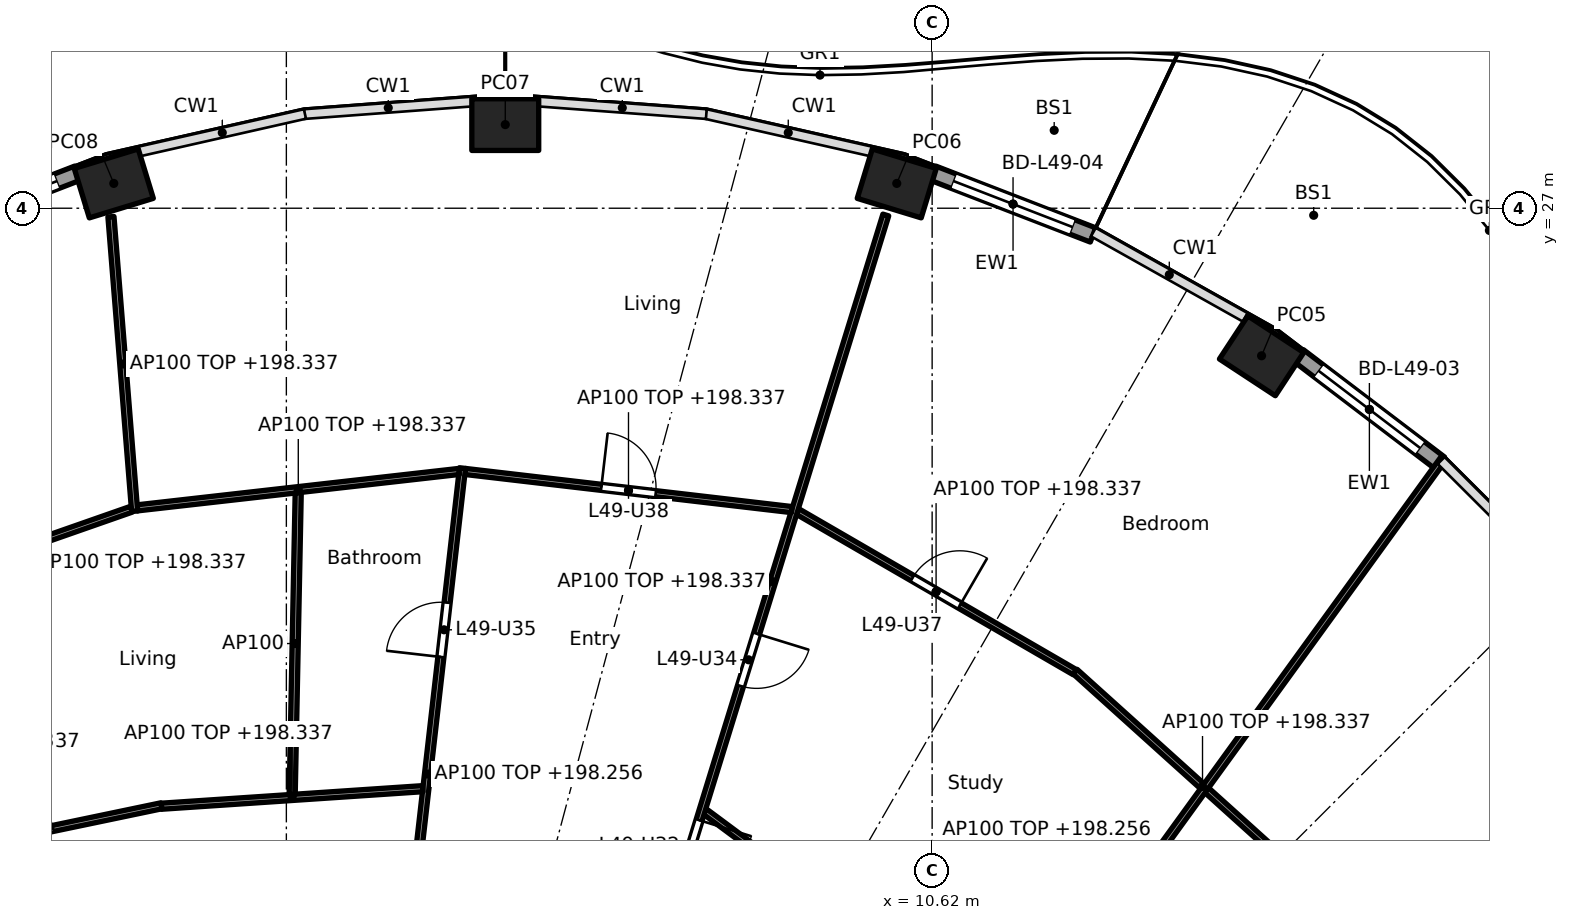
"""IFC4 building model, lengths in metres.
Left out: names, types, materials, properties, quantities, classifications, styles, units other than length and angle.
Written with IfcOpenShell. Run it as: python <this file> out.ifc"""

import sys

from ifc_helpers import new_model, si_unit, direction, frame, frame_2d, origin, origin_2d, place, context, subcontext, project, spatial, rectangle, hollow_rectangle, extrude, element, fill, save


model = new_model("IFC4")
c1 = context("Model", 3, precision=1e-05, world=origin(), true_north=direction((0.0, 1.0)))
c2 = subcontext(c1, "Body", "Model", "MODEL_VIEW")
j1 = project(units=[si_unit("LENGTHUNIT", "METRE"), si_unit("PLANEANGLEUNIT", "RADIAN")], contexts=[c1])
p1 = place(None, origin())
s1 = spatial("IfcSite", under=j1, at=p1, CompositionType="ELEMENT")
p2 = place(p1, origin())
s2 = spatial("IfcBuilding", under=s1, at=p2, CompositionType="ELEMENT")
p3 = place(p2, frame((0.0, 0.0, 195.5)))
s3 = spatial("IfcBuildingStorey", under=s2, at=p3, CompositionType="ELEMENT", Elevation=195.5)
for number, where, z_axis, x_axis in (
    (1, (16.038, 24.573, 0.0), (0.0, 0.0, 1.0), (-0.836, 0.549, 0.0)),
    (2, (10.038, 27.408, 0.0), (0.0, 0.0, 1.0), (-0.957, 0.292, 0.0)),
    (3, (3.6, 28.375, 0.0), (0.0, 0.0, 1.0), (-1.0, 0.0, 0.0)),
    (4, (-2.838, 27.408, 0.0), (0.0, 0.0, 1.0), (-0.957, -0.292, 0.0)),
):
    element("IfcColumn", number, at=place(p3, frame(where, z_axis=z_axis, x_axis=x_axis)), inside=s3, PredefinedType="COLUMN", context=c2, shape_type="SweptSolid", body=[
        extrude(hollow_rectangle(XDim=1.1, YDim=0.85, WallThickness=0.036, at=origin_2d()), origin(), (0.0, 0.0, 1.0), 3.7),
    ])
p4 = place(p3, frame((16.65, 24.574, 0.0), z_axis=(0.0, 0.0, 1.0), x_axis=(0.796055733703, -0.60522332146, 0.0)))
e5 = element("IfcWall", 5, at=p4, inside=s3, PredefinedType="SOLIDWALL", context=c2, shape_type="SweptSolid", body=[
    extrude(rectangle(XDim=2.917, YDim=0.25, at=frame_2d((1.458, 0.0))), origin(), (0.0, 0.0, 1.0), 3.44),
])
p5 = place(p4, frame((0.408, 0.0, 0.0)))
e6 = element("IfcOpeningElement", 6, at=p5, cuts=e5, PredefinedType="OPENING", context=c2, shape_type="SweptSolid", body=[
    extrude(rectangle(XDim=2.1, YDim=2.4, at=frame_2d((1.05, 1.2))), frame((0.0, 0.135, 0.0), z_axis=(0.0, -1.0, 0.0), x_axis=(1.0, 0.0, 0.0)), (0.0, 0.0, 1.0), 0.27),
])
p6 = place(p3, frame((10.635, 27.576, 0.0), z_axis=(0.0, 0.0, 1.0), x_axis=(0.932806734513, -0.360377019311, 0.0)))
e7 = element("IfcWall", 7, at=p6, inside=s3, PredefinedType="SOLIDWALL", context=c2, shape_type="SweptSolid", body=[
    extrude(rectangle(XDim=2.82, YDim=0.25, at=frame_2d((1.41, 0.0))), origin(), (0.0, 0.0, 1.0), 3.44),
])
p7 = place(p6, frame((0.36, 0.0, 0.0)))
e8 = element("IfcOpeningElement", 8, at=p7, cuts=e7, PredefinedType="OPENING", context=c2, shape_type="SweptSolid", body=[
    extrude(rectangle(XDim=2.1, YDim=2.4, at=frame_2d((1.05, 1.2))), frame((0.0, 0.135, 0.0), z_axis=(0.0, -1.0, 0.0), x_axis=(1.0, 0.0, 0.0)), (0.0, 0.0, 1.0), 0.27),
])
p8 = place(p3, frame((-6.065, 26.56, 0.0), z_axis=(0.0, 0.0, 1.0), x_axis=(0.932795487898, 0.360406128911, 0.0)))
e9 = element("IfcWall", 9, at=p8, inside=s3, PredefinedType="SOLIDWALL", context=c2, shape_type="SweptSolid", body=[
    extrude(rectangle(XDim=2.819, YDim=0.25, at=frame_2d((1.41, 0.0))), origin(), (0.0, 0.0, 1.0), 3.44),
])
p9 = place(p8, frame((0.36, 0.0, 0.0)))
e10 = element("IfcOpeningElement", 10, at=p9, cuts=e9, PredefinedType="OPENING", context=c2, shape_type="SweptSolid", body=[
    extrude(rectangle(XDim=2.1, YDim=2.4, at=frame_2d((1.05, 1.2))), frame((0.0, 0.135, 0.0), z_axis=(0.0, -1.0, 0.0), x_axis=(1.0, 0.0, 0.0)), (0.0, 0.0, 1.0), 0.27),
])
p10 = place(p3, frame((17.162, 15.603, 0.0), z_axis=(0.0, 0.0, 1.0), x_axis=(-0.742768881471, 0.669547898748, 0.0)))
e11 = element("IfcWall", 11, at=p10, inside=s3, PredefinedType="PARTITIONING", context=c2, shape_type="SweptSolid", body=[
    extrude(rectangle(XDim=5.642, YDim=0.1, at=frame_2d((2.821, 0.0))), origin(), (0.0, 0.0, 1.0), 2.837),
])
p11 = place(p3, frame((8.943, 8.966, 0.0), z_axis=(0.0, 0.0, 1.0), x_axis=(0.586803608919, 0.809729290912, 0.0)))
e12 = element("IfcWall", 12, at=p11, inside=s3, PredefinedType="PARTITIONING", context=c2, shape_type="SweptSolid", body=[
    extrude(rectangle(XDim=17.179, YDim=0.1, at=frame_2d((8.589, 0.0))), origin(), (0.0, 0.0, 1.0), 2.756),
])
p12 = place(p11, frame((2.062, 0.0, 0.0)))
e13 = element("IfcOpeningElement", 13, at=p12, cuts=e12, PredefinedType="OPENING", context=c2, shape_type="SweptSolid", body=[
    extrude(rectangle(XDim=0.9, YDim=2.1, at=frame_2d((0.45, 1.05))), frame((0.0, 0.06, 0.0), z_axis=(0.0, -1.0, 0.0), x_axis=(1.0, 0.0, 0.0)), (0.0, 0.0, 1.0), 0.12),
])
p13 = place(p11, frame((7.308, 0.0, 0.0)))
e14 = element("IfcOpeningElement", 14, at=p13, cuts=e12, PredefinedType="OPENING", context=c2, shape_type="SweptSolid", body=[
    extrude(rectangle(XDim=0.9, YDim=2.1, at=frame_2d((0.45, 1.05))), frame((0.0, 0.06, 0.0), z_axis=(0.0, -1.0, 0.0), x_axis=(1.0, 0.0, 0.0)), (0.0, 0.0, 1.0), 0.12),
])
p14 = place(p3, frame((10.207, 14.61, 0.0), z_axis=(0.0, 0.0, 1.0), x_axis=(-0.802784956441, 0.596268659005, 0.0)))
e15 = element("IfcWall", 15, at=p14, inside=s3, PredefinedType="PARTITIONING", context=c2, shape_type="SweptSolid", body=[
    extrude(rectangle(XDim=4.142, YDim=0.1, at=frame_2d((2.071, 0.0))), origin(), (0.0, 0.0, 1.0), 2.837),
])
p15 = place(p3, frame((12.965, 19.371, 0.0), z_axis=(0.0, 0.0, 1.0), x_axis=(-0.865277177388, 0.501293732547, 0.0)))
e16 = element("IfcWall", 16, at=p15, inside=s3, PredefinedType="PARTITIONING", context=c2, shape_type="SweptSolid", body=[
    extrude(rectangle(XDim=5.27, YDim=0.1, at=frame_2d((2.635, 0.0))), origin(), (0.0, 0.0, 1.0), 2.837),
])
p16 = place(p15, frame((2.185, 0.0, 0.0)))
e17 = element("IfcOpeningElement", 17, at=p16, cuts=e16, PredefinedType="OPENING", context=c2, shape_type="SweptSolid", body=[
    extrude(rectangle(XDim=0.9, YDim=2.1, at=frame_2d((0.45, 1.05))), frame((0.0, 0.06, 0.0), z_axis=(0.0, -1.0, 0.0), x_axis=(1.0, 0.0, 0.0)), (0.0, 0.0, 1.0), 0.12),
])
p17 = place(p3, frame((6.138, 14.83, 0.0), z_axis=(0.0, 0.0, 1.0), x_axis=(0.294818517221, 0.955553264818, 0.0)))
e18 = element("IfcWall", 18, at=p17, inside=s3, PredefinedType="PARTITIONING", context=c2, shape_type="SweptSolid", body=[
    extrude(rectangle(XDim=12.619, YDim=0.1, at=frame_2d((6.31, 0.0))), origin(), (0.0, 0.0, 1.0), 2.837),
])
p18 = place(p17, frame((1.306, 0.0, 0.0)))
e19 = element("IfcOpeningElement", 19, at=p18, cuts=e18, PredefinedType="OPENING", context=c2, shape_type="SweptSolid", body=[
    extrude(rectangle(XDim=0.9, YDim=2.1, at=frame_2d((0.45, 1.05))), frame((0.0, 0.06, 0.0), z_axis=(0.0, -1.0, 0.0), x_axis=(1.0, 0.0, 0.0)), (0.0, 0.0, 1.0), 0.12),
])
p19 = place(p17, frame((4.515, 0.0, 0.0)))
e20 = element("IfcOpeningElement", 20, at=p19, cuts=e18, PredefinedType="OPENING", context=c2, shape_type="SweptSolid", body=[
    extrude(rectangle(XDim=0.9, YDim=2.1, at=frame_2d((0.45, 1.05))), frame((0.0, 0.06, 0.0), z_axis=(0.0, -1.0, 0.0), x_axis=(1.0, 0.0, 0.0)), (0.0, 0.0, 1.0), 0.12),
])
p20 = place(p3, frame((8.312, 22.044, 0.0), z_axis=(0.0, 0.0, 1.0), x_axis=(-0.993245806382, 0.1160291692, 0.0)))
e21 = element("IfcWall", 21, at=p20, inside=s3, PredefinedType="PARTITIONING", context=c2, shape_type="SweptSolid", body=[
    extrude(rectangle(XDim=5.408, YDim=0.1, at=frame_2d((2.704, 0.0))), origin(), (0.0, 0.0, 1.0), 2.837),
])
p21 = place(p20, frame((2.254, 0.0, 0.0)))
e22 = element("IfcOpeningElement", 22, at=p21, cuts=e21, PredefinedType="OPENING", context=c2, shape_type="SweptSolid", body=[
    extrude(rectangle(XDim=0.9, YDim=2.1, at=frame_2d((0.45, 1.05))), frame((0.0, 0.06, 0.0), z_axis=(0.0, -1.0, 0.0), x_axis=(1.0, 0.0, 0.0)), (0.0, 0.0, 1.0), 0.12),
])
p22 = place(p3, frame((1.746, 12.664, 0.0), z_axis=(0.0, 0.0, 1.0), x_axis=(0.113629529561, 0.993523190475, 0.0)))
e23 = element("IfcWall", 23, at=p22, inside=s3, PredefinedType="PARTITIONING", context=c2, shape_type="SweptSolid", body=[
    extrude(rectangle(XDim=10.128, YDim=0.1, at=frame_2d((5.064, 0.0))), origin(), (0.0, 0.0, 1.0), 2.756),
])
p23 = place(p22, frame((1.962, 0.0, 0.0)))
e24 = element("IfcOpeningElement", 24, at=p23, cuts=e23, PredefinedType="OPENING", context=c2, shape_type="SweptSolid", body=[
    extrude(rectangle(XDim=0.9, YDim=2.1, at=frame_2d((0.45, 1.05))), frame((0.0, 0.06, 0.0), z_axis=(0.0, -1.0, 0.0), x_axis=(1.0, 0.0, 0.0)), (0.0, 0.0, 1.0), 0.12),
])
p24 = place(p22, frame((7.002, 0.0, 0.0)))
e25 = element("IfcOpeningElement", 25, at=p24, cuts=e23, PredefinedType="OPENING", context=c2, shape_type="SweptSolid", body=[
    extrude(rectangle(XDim=0.9, YDim=2.1, at=frame_2d((0.45, 1.05))), frame((0.0, 0.06, 0.0), z_axis=(0.0, -1.0, 0.0), x_axis=(1.0, 0.0, 0.0)), (0.0, 0.0, 1.0), 0.12),
])
p25 = place(p3, frame((2.244, 17.455, 0.0), z_axis=(0.0, 0.0, 1.0), x_axis=(-0.997754717554, -0.066974051687, 0.0)))
e26 = element("IfcWall", 26, at=p25, inside=s3, PredefinedType="PARTITIONING", context=c2, shape_type="SweptSolid", body=[
    extrude(rectangle(XDim=4.309, YDim=0.1, at=frame_2d((2.154, 0.0))), origin(), (0.0, 0.0, 1.0), 2.837),
])
p26 = place(p3, frame((2.842, 22.671, 0.0), z_axis=(0.0, 0.0, 1.0), x_axis=(-0.993660315081, -0.112424099879, 0.0)))
e27 = element("IfcWall", 27, at=p26, inside=s3, PredefinedType="PARTITIONING", context=c2, shape_type="SweptSolid", body=[
    extrude(rectangle(XDim=5.325, YDim=0.1, at=frame_2d((2.662, 0.0))), origin(), (0.0, 0.0, 1.0), 2.837),
])
p27 = place(p3, frame((0.096, 17.36, 0.0), z_axis=(0.0, 0.0, 1.0), x_axis=(0.019973380305, 0.999800512142, 0.0)))
e28 = element("IfcWall", 28, at=p27, inside=s3, PredefinedType="PARTITIONING", context=c2, shape_type="SweptSolid", body=[
    extrude(rectangle(XDim=4.963, YDim=0.1, at=frame_2d((2.481, 0.0))), origin(), (0.0, 0.0, 1.0), 3.44),
])
p28 = place(p3, frame((-2.056, 17.173, 0.0), z_axis=(0.0, 0.0, 1.0), x_axis=(-0.978902917122, -0.20432591331, 0.0)))
e29 = element("IfcWall", 29, at=p28, inside=s3, PredefinedType="PARTITIONING", context=c2, shape_type="SweptSolid", body=[
    extrude(rectangle(XDim=4.486, YDim=0.1, at=frame_2d((2.243, 0.0))), origin(), (0.0, 0.0, 1.0), 2.837),
])
p29 = place(p28, frame((1.818, 0.0, 0.0)))
e30 = element("IfcOpeningElement", 30, at=p29, cuts=e29, PredefinedType="OPENING", context=c2, shape_type="SweptSolid", body=[
    extrude(rectangle(XDim=0.9, YDim=2.1, at=frame_2d((0.45, 1.05))), frame((0.0, 0.06, 0.0), z_axis=(0.0, -1.0, 0.0), x_axis=(1.0, 0.0, 0.0)), (0.0, 0.0, 1.0), 0.12),
])
p30 = place(p3, frame((-2.495, 22.017, 0.0), z_axis=(0.0, 0.0, 1.0), x_axis=(-0.080150660566, 0.99678276049, 0.0)))
e31 = element("IfcWall", 31, at=p30, inside=s3, PredefinedType="PARTITIONING", context=c2, shape_type="SweptSolid", body=[
    extrude(rectangle(XDim=4.858, YDim=0.1, at=frame_2d((2.429, 0.0))), origin(), (0.0, 0.0, 1.0), 2.837),
])
p31 = place(p3, frame((-2.546, 22.051, 0.0), z_axis=(0.0, 0.0, 1.0), x_axis=(-0.94391294884, -0.330194404878, 0.0)))
e32 = element("IfcWall", 32, at=p31, inside=s3, PredefinedType="PARTITIONING", context=c2, shape_type="SweptSolid", body=[
    extrude(rectangle(XDim=5.367, YDim=0.1, at=frame_2d((2.684, 0.0))), origin(), (0.0, 0.0, 1.0), 2.837),
])
p32 = place(p31, frame((2.234, 0.0, 0.0)))
e33 = element("IfcOpeningElement", 33, at=p32, cuts=e32, PredefinedType="OPENING", context=c2, shape_type="SweptSolid", body=[
    extrude(rectangle(XDim=0.9, YDim=2.1, at=frame_2d((0.45, 1.05))), frame((0.0, 0.06, 0.0), z_axis=(0.0, -1.0, 0.0), x_axis=(1.0, 0.0, 0.0)), (0.0, 0.0, 1.0), 0.12),
])
p33 = place(p5, origin())
e34 = element("IfcDoor", 34, at=p33, inside=s3, OperationType="SLIDING_TO_LEFT", PredefinedType="DOOR", context=c2, shape_type="SweptSolid", body=[
    extrude(rectangle(XDim=2.1, YDim=2.4, at=frame_2d((1.05, 1.2))), frame((0.0, 0.025, 0.0), z_axis=(0.0, -1.0, 0.0), x_axis=(1.0, 0.0, 0.0)), (0.0, 0.0, 1.0), 0.05),
])
fill(e6, e34)
p34 = place(p7, origin())
e35 = element("IfcDoor", 35, at=p34, inside=s3, OperationType="SLIDING_TO_LEFT", PredefinedType="DOOR", context=c2, shape_type="SweptSolid", body=[
    extrude(rectangle(XDim=2.1, YDim=2.4, at=frame_2d((1.05, 1.2))), frame((0.0, 0.025, 0.0), z_axis=(0.0, -1.0, 0.0), x_axis=(1.0, 0.0, 0.0)), (0.0, 0.0, 1.0), 0.05),
])
fill(e8, e35)
p35 = place(p9, origin())
e36 = element("IfcDoor", 36, at=p35, inside=s3, OperationType="SLIDING_TO_LEFT", PredefinedType="DOOR", context=c2, shape_type="SweptSolid", body=[
    extrude(rectangle(XDim=2.1, YDim=2.4, at=frame_2d((1.05, 1.2))), frame((0.0, 0.025, 0.0), z_axis=(0.0, -1.0, 0.0), x_axis=(1.0, 0.0, 0.0)), (0.0, 0.0, 1.0), 0.05),
])
fill(e10, e36)
p36 = place(p18, frame((0.9, 0.0, 0.0), x_axis=(-1.0, 0.0, 0.0)))
e37 = element("IfcDoor", 37, at=p36, inside=s3, OperationType="SINGLE_SWING_LEFT", PredefinedType="DOOR", context=c2, shape_type="SweptSolid", body=[
    extrude(rectangle(XDim=0.9, YDim=2.1, at=frame_2d((0.45, 1.05))), frame((0.0, 0.025, 0.0), z_axis=(0.0, -1.0, 0.0), x_axis=(1.0, 0.0, 0.0)), (0.0, 0.0, 1.0), 0.05),
])
fill(e19, e37)
p37 = place(p19, frame((0.9, 0.0, 0.0), x_axis=(-1.0, 0.0, 0.0)))
e38 = element("IfcDoor", 38, at=p37, inside=s3, OperationType="SINGLE_SWING_LEFT", PredefinedType="DOOR", context=c2, shape_type="SweptSolid", body=[
    extrude(rectangle(XDim=0.9, YDim=2.1, at=frame_2d((0.45, 1.05))), frame((0.0, 0.025, 0.0), z_axis=(0.0, -1.0, 0.0), x_axis=(1.0, 0.0, 0.0)), (0.0, 0.0, 1.0), 0.05),
])
fill(e20, e38)
p38 = place(p24, origin())
e39 = element("IfcDoor", 39, at=p38, inside=s3, OperationType="SINGLE_SWING_LEFT", PredefinedType="DOOR", context=c2, shape_type="SweptSolid", body=[
    extrude(rectangle(XDim=0.9, YDim=2.1, at=frame_2d((0.45, 1.05))), frame((0.0, 0.025, 0.0), z_axis=(0.0, -1.0, 0.0), x_axis=(1.0, 0.0, 0.0)), (0.0, 0.0, 1.0), 0.05),
])
fill(e25, e39)
p39 = place(p29, frame((0.9, 0.0, 0.0), x_axis=(-1.0, 0.0, 0.0)))
e40 = element("IfcDoor", 40, at=p39, inside=s3, OperationType="SINGLE_SWING_LEFT", PredefinedType="DOOR", context=c2, shape_type="SweptSolid", body=[
    extrude(rectangle(XDim=0.9, YDim=2.1, at=frame_2d((0.45, 1.05))), frame((0.0, 0.025, 0.0), z_axis=(0.0, -1.0, 0.0), x_axis=(1.0, 0.0, 0.0)), (0.0, 0.0, 1.0), 0.05),
])
fill(e30, e40)
p40 = place(p16, frame((0.9, 0.0, 0.0), x_axis=(-1.0, 0.0, 0.0)))
e41 = element("IfcDoor", 41, at=p40, inside=s3, OperationType="SINGLE_SWING_RIGHT", PredefinedType="DOOR", context=c2, shape_type="SweptSolid", body=[
    extrude(rectangle(XDim=0.9, YDim=2.1, at=frame_2d((0.45, 1.05))), frame((0.0, 0.025, 0.0), z_axis=(0.0, -1.0, 0.0), x_axis=(1.0, 0.0, 0.0)), (0.0, 0.0, 1.0), 0.05),
])
fill(e17, e41)
p41 = place(p21, frame((0.9, 0.0, 0.0), x_axis=(-1.0, 0.0, 0.0)))
e42 = element("IfcDoor", 42, at=p41, inside=s3, OperationType="SINGLE_SWING_LEFT", PredefinedType="DOOR", context=c2, shape_type="SweptSolid", body=[
    extrude(rectangle(XDim=0.9, YDim=2.1, at=frame_2d((0.45, 1.05))), frame((0.0, 0.025, 0.0), z_axis=(0.0, -1.0, 0.0), x_axis=(1.0, 0.0, 0.0)), (0.0, 0.0, 1.0), 0.05),
])
fill(e22, e42)
save(model, sys.argv[1])
